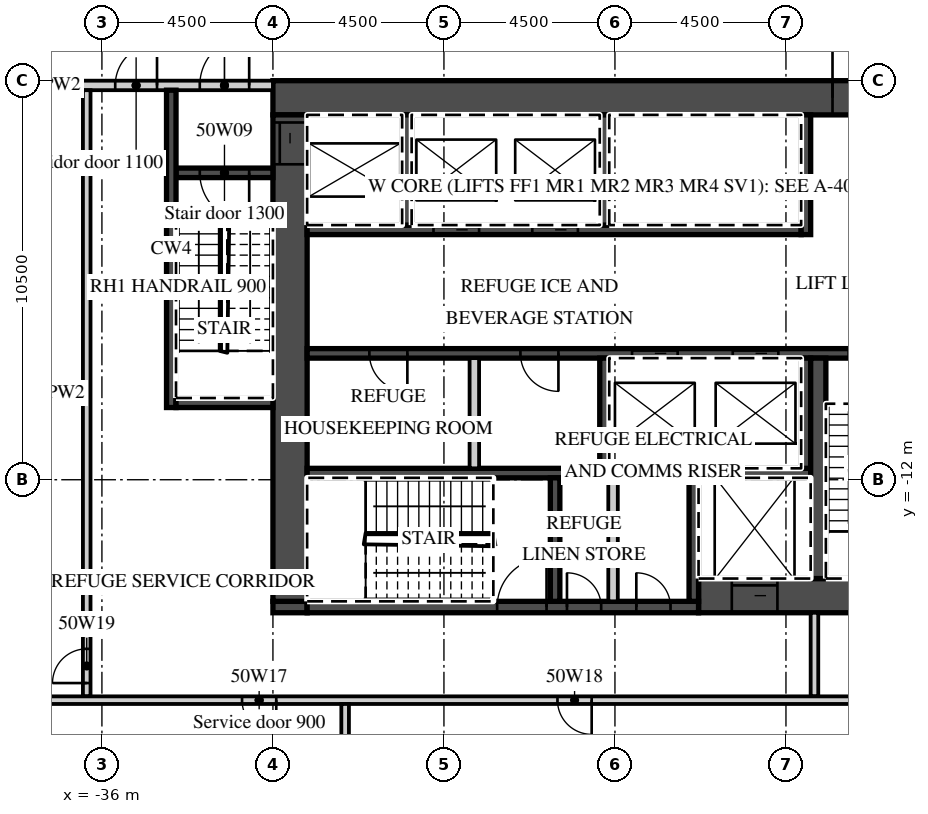
"""IFC4 building model, lengths in metres.
Left out: names, types, materials, properties, quantities, classifications, styles, units other than length and angle.
Written with IfcOpenShell. Run it as: python <this file> out.ifc"""

import sys

from ifc_helpers import new_model, si_unit, direction, frame, frame_2d, origin, place, context, subcontext, project, spatial, rectangle, extrude, element, fill, save


model = new_model("IFC4")
c1 = context("Model", 3, precision=1e-05, world=origin(), true_north=direction((0.0, 1.0)))
c2 = subcontext(c1, "Body", "Model", "MODEL_VIEW")
j1 = project(units=[si_unit("LENGTHUNIT", "METRE"), si_unit("PLANEANGLEUNIT", "RADIAN")], contexts=[c1])
p1 = place(None, origin())
s1 = spatial("IfcSite", under=j1, at=p1, CompositionType="ELEMENT")
p2 = place(p1, origin())
s2 = spatial("IfcBuilding", under=s1, at=p2, CompositionType="ELEMENT")
p3 = place(p2, frame((0.0, 0.0, 206.5)))
s3 = spatial("IfcBuildingStorey", under=s2, at=p3, CompositionType="ELEMENT", Elevation=206.5)
p4 = place(p3, frame((-31.5, -1.95, 0.0), z_axis=(0.0, 0.0, 1.0), x_axis=(1.0, 0.0, 0.0)))
e1 = element("IfcWall", 1, at=p4, inside=s3, PredefinedType="SHEAR", context=c2, shape_type="SweptSolid", body=[
    extrude(rectangle(XDim=18.0, YDim=0.9, at=frame_2d((9.0, 0.0))), origin(), (0.0, 0.0, 1.0), 4.2),
])
p5 = place(p4, frame((14.725, 0.0, 0.0)))
e2 = element("IfcOpeningElement", 2, at=p5, cuts=e1, PredefinedType="OPENING", context=c2, shape_type="SweptSolid", body=[
    extrude(rectangle(XDim=1.8, YDim=2.1, at=frame_2d((0.9, 1.05))), frame((0.0, 0.46, 0.0), z_axis=(0.0, -1.0, 0.0), x_axis=(1.0, 0.0, 0.0)), (0.0, 0.0, 1.0), 0.92),
])
p6 = place(p3, frame((-20.3, -15.05, 0.0), z_axis=(0.0, 0.0, 1.0), x_axis=(1.0, 0.0, 0.0)))
e3 = element("IfcWall", 3, at=p6, inside=s3, PredefinedType="SHEAR", context=c2, shape_type="SweptSolid", body=[
    extrude(rectangle(XDim=6.8, YDim=0.9, at=frame_2d((3.4, 0.0))), origin(), (0.0, 0.0, 1.0), 4.2),
])
p7 = place(p6, frame((0.875, 0.0, 0.0)))
e4 = element("IfcOpeningElement", 4, at=p7, cuts=e3, PredefinedType="OPENING", context=c2, shape_type="SweptSolid", body=[
    extrude(rectangle(XDim=1.2, YDim=2.1, at=frame_2d((0.6, 1.05))), frame((0.0, 0.46, 0.0), z_axis=(0.0, -1.0, 0.0), x_axis=(1.0, 0.0, 0.0)), (0.0, 0.0, 1.0), 0.92),
])
p8 = place(p3, frame((-31.5, -15.35, 0.0), z_axis=(0.0, 0.0, 1.0), x_axis=(1.0, 0.0, 0.0)))
e5 = element("IfcWall", 5, at=p8, inside=s3, PredefinedType="SHEAR", context=c2, shape_type="SweptSolid", body=[
    extrude(rectangle(XDim=0.9, YDim=0.3, at=frame_2d((0.45, 0.0))), origin(), (0.0, 0.0, 1.0), 4.2),
])
p9 = place(p3, frame((-30.6, -15.35, 0.0), z_axis=(0.0, 0.0, 1.0), x_axis=(1.0, 0.0, 0.0)))
e6 = element("IfcWall", 6, at=p9, inside=s3, PredefinedType="SHEAR", context=c2, shape_type="SweptSolid", body=[
    extrude(rectangle(XDim=10.3, YDim=0.3, at=frame_2d((5.15, 0.0))), origin(), (0.0, 0.0, 1.0), 4.2),
])
p10 = place(p9, frame((5.0, 0.0, 0.0)))
e7 = element("IfcOpeningElement", 7, at=p10, cuts=e6, PredefinedType="OPENING", context=c2, shape_type="SweptSolid", body=[
    extrude(rectangle(XDim=1.3, YDim=2.1, at=frame_2d((0.65, 1.05))), frame((0.0, 0.16, 0.0), z_axis=(0.0, -1.0, 0.0), x_axis=(1.0, 0.0, 0.0)), (0.0, 0.0, 1.0), 0.32),
])
p11 = place(p9, frame((6.837, 0.0, 0.0)))
e8 = element("IfcOpeningElement", 8, at=p11, cuts=e6, PredefinedType="OPENING", context=c2, shape_type="SweptSolid", body=[
    extrude(rectangle(XDim=0.9, YDim=2.1, at=frame_2d((0.45, 1.05))), frame((0.0, 0.16, 0.0), z_axis=(0.0, -1.0, 0.0), x_axis=(1.0, 0.0, 0.0)), (0.0, 0.0, 1.0), 0.32),
])
p12 = place(p9, frame((8.663, 0.0, 0.0)))
e9 = element("IfcOpeningElement", 9, at=p12, cuts=e6, PredefinedType="OPENING", context=c2, shape_type="SweptSolid", body=[
    extrude(rectangle(XDim=0.9, YDim=2.1, at=frame_2d((0.45, 1.05))), frame((0.0, 0.16, 0.0), z_axis=(0.0, -1.0, 0.0), x_axis=(1.0, 0.0, 0.0)), (0.0, 0.0, 1.0), 0.32),
])
p13 = place(p3, frame((-31.05, -15.2, 0.0), z_axis=(0.0, 0.0, 1.0), x_axis=(0.0, 1.0, 0.0)))
e10 = element("IfcWall", 10, at=p13, inside=s3, PredefinedType="SHEAR", context=c2, shape_type="SweptSolid", body=[
    extrude(rectangle(XDim=12.8, YDim=0.9, at=frame_2d((6.4, 0.0))), origin(), (0.0, 0.0, 1.0), 4.2),
])
p14 = place(p13, frame((11.5, 0.0, 0.0)))
e11 = element("IfcOpeningElement", 11, at=p14, cuts=e10, PredefinedType="OPENING", context=c2, shape_type="SweptSolid", body=[
    extrude(rectangle(XDim=1.1, YDim=2.1, at=frame_2d((0.55, 1.05))), frame((0.0, 0.46, 0.0), z_axis=(0.0, -1.0, 0.0), x_axis=(1.0, 0.0, 0.0)), (0.0, 0.0, 1.0), 0.92),
])
p15 = place(p3, frame((-30.6, -5.425, 0.0), z_axis=(0.0, 0.0, 1.0), x_axis=(1.0, 0.0, 0.0)))
e12 = element("IfcWall", 12, at=p15, inside=s3, PredefinedType="SHEAR", context=c2, shape_type="SweptSolid", body=[
    extrude(rectangle(XDim=13.0, YDim=0.25, at=frame_2d((6.5, 0.0))), origin(), (0.0, 0.0, 1.0), 4.2),
])
p16 = place(p15, frame((3.325, 0.0, 0.0)))
e13 = element("IfcOpeningElement", 13, at=p16, cuts=e12, PredefinedType="OPENING", context=c2, shape_type="SweptSolid", body=[
    extrude(rectangle(XDim=1.2, YDim=2.1, at=frame_2d((0.6, 1.05))), frame((0.0, 0.135, 0.0), z_axis=(0.0, -1.0, 0.0), x_axis=(1.0, 0.0, 0.0)), (0.0, 0.0, 1.0), 0.27),
])
p17 = place(p15, frame((5.925, 0.0, 0.0)))
e14 = element("IfcOpeningElement", 14, at=p17, cuts=e12, PredefinedType="OPENING", context=c2, shape_type="SweptSolid", body=[
    extrude(rectangle(XDim=1.2, YDim=2.1, at=frame_2d((0.6, 1.05))), frame((0.0, 0.135, 0.0), z_axis=(0.0, -1.0, 0.0), x_axis=(1.0, 0.0, 0.0)), (0.0, 0.0, 1.0), 0.27),
])
p18 = place(p3, frame((-17.475, -5.55, 0.0), z_axis=(0.0, 0.0, 1.0), x_axis=(0.0, 1.0, 0.0)))
e15 = element("IfcWall", 15, at=p18, inside=s3, PredefinedType="SHEAR", context=c2, shape_type="SweptSolid", body=[
    extrude(rectangle(XDim=3.15, YDim=0.25, at=frame_2d((1.575, 0.0))), origin(), (0.0, 0.0, 1.0), 4.2),
])
for number, where, z_axis, x_axis in (
    (16, (-27.975, -5.3, 0.0), (0.0, 0.0, 1.0), (0.0, 1.0, 0.0)),
    (17, (-22.775, -5.3, 0.0), (0.0, 0.0, 1.0), (0.0, 1.0, 0.0)),
):
    element("IfcWall", number, at=place(p3, frame(where, z_axis=z_axis, x_axis=x_axis)), inside=s3, PredefinedType="SHEAR", context=c2, shape_type="SweptSolid", body=[
        extrude(rectangle(XDim=2.9, YDim=0.25, at=frame_2d((1.45, 0.0))), origin(), (0.0, 0.0, 1.0), 4.2),
    ])
p19 = place(p3, frame((-30.6, -8.675, 0.0), z_axis=(0.0, 0.0, 1.0), x_axis=(1.0, 0.0, 0.0)))
e18 = element("IfcWall", 18, at=p19, inside=s3, PredefinedType="SHEAR", context=c2, shape_type="SweptSolid", body=[
    extrude(rectangle(XDim=16.2, YDim=0.25, at=frame_2d((8.1, 0.0))), origin(), (0.0, 0.0, 1.0), 4.2),
])
p20 = place(p19, frame((8.55, 0.0, 0.0)))
e19 = element("IfcOpeningElement", 19, at=p20, cuts=e18, PredefinedType="OPENING", context=c2, shape_type="SweptSolid", body=[
    extrude(rectangle(XDim=1.2, YDim=2.1, at=frame_2d((0.6, 1.05))), frame((0.0, 0.135, 0.0), z_axis=(0.0, -1.0, 0.0), x_axis=(1.0, 0.0, 0.0)), (0.0, 0.0, 1.0), 0.27),
])
p21 = place(p19, frame((11.2, 0.0, 0.0)))
e20 = element("IfcOpeningElement", 20, at=p21, cuts=e18, PredefinedType="OPENING", context=c2, shape_type="SweptSolid", body=[
    extrude(rectangle(XDim=1.2, YDim=2.1, at=frame_2d((0.6, 1.05))), frame((0.0, 0.135, 0.0), z_axis=(0.0, -1.0, 0.0), x_axis=(1.0, 0.0, 0.0)), (0.0, 0.0, 1.0), 0.27),
])
p22 = place(p19, frame((14.25, 0.0, 0.0)))
e21 = element("IfcOpeningElement", 21, at=p22, cuts=e18, PredefinedType="OPENING", context=c2, shape_type="SweptSolid", body=[
    extrude(rectangle(XDim=1.3, YDim=2.1, at=frame_2d((0.65, 1.05))), frame((0.0, 0.135, 0.0), z_axis=(0.0, -1.0, 0.0), x_axis=(1.0, 0.0, 0.0)), (0.0, 0.0, 1.0), 0.27),
])
p23 = place(p19, frame((1.637, 0.0, 0.0)))
e22 = element("IfcOpeningElement", 22, at=p23, cuts=e18, PredefinedType="OPENING", context=c2, shape_type="SweptSolid", body=[
    extrude(rectangle(XDim=1.0, YDim=2.1, at=frame_2d((0.5, 1.05))), frame((0.0, 0.135, 0.0), z_axis=(0.0, -1.0, 0.0), x_axis=(1.0, 0.0, 0.0)), (0.0, 0.0, 1.0), 0.27),
])
p24 = place(p19, frame((5.613, 0.0, 0.0)))
e23 = element("IfcOpeningElement", 23, at=p24, cuts=e18, PredefinedType="OPENING", context=c2, shape_type="SweptSolid", body=[
    extrude(rectangle(XDim=1.0, YDim=2.1, at=frame_2d((0.5, 1.05))), frame((0.0, 0.135, 0.0), z_axis=(0.0, -1.0, 0.0), x_axis=(1.0, 0.0, 0.0)), (0.0, 0.0, 1.0), 0.27),
])
p25 = place(p3, frame((-30.6, -11.825, 0.0), z_axis=(0.0, 0.0, 1.0), x_axis=(1.0, 0.0, 0.0)))
e24 = element("IfcWall", 24, at=p25, inside=s3, PredefinedType="SHEAR", context=c2, shape_type="SweptSolid", body=[
    extrude(rectangle(XDim=13.25, YDim=0.25, at=frame_2d((6.625, 0.0))), origin(), (0.0, 0.0, 1.0), 4.2),
])
for number, where, z_axis, x_axis in (
    (25, (-17.475, -11.7, 0.0), (0.0, 0.0, 1.0), (0.0, 1.0, 0.0)),
    (26, (-22.775, -11.7, 0.0), (0.0, 0.0, 1.0), (0.0, 1.0, 0.0)),
):
    element("IfcWall", number, at=place(p3, frame(where, z_axis=z_axis, x_axis=x_axis)), inside=s3, PredefinedType="SHEAR", context=c2, shape_type="SweptSolid", body=[
        extrude(rectangle(XDim=2.9, YDim=0.25, at=frame_2d((1.45, 0.0))), origin(), (0.0, 0.0, 1.0), 4.2),
    ])
p26 = place(p3, frame((-26.2, -11.7, 0.0), z_axis=(0.0, 0.0, 1.0), x_axis=(0.0, 1.0, 0.0)))
e27 = element("IfcWall", 27, at=p26, inside=s3, PredefinedType="PARTITIONING", context=c2, shape_type="SweptSolid", body=[
    extrude(rectangle(XDim=2.9, YDim=0.25, at=frame_2d((1.45, 0.0))), origin(), (0.0, 0.0, 1.0), 4.2),
])
p27 = place(p3, frame((-17.15, -14.6, 0.0), z_axis=(0.0, 0.0, 1.0), x_axis=(0.0, 1.0, 0.0)))
e28 = element("IfcWall", 28, at=p27, inside=s3, PredefinedType="SHEAR", context=c2, shape_type="SweptSolid", body=[
    extrude(rectangle(XDim=5.8, YDim=0.4, at=frame_2d((2.9, 0.0))), origin(), (0.0, 0.0, 1.0), 4.2),
])
for number, where, z_axis, x_axis in (
    (29, (-20.425, -15.2, 0.0), (0.0, 0.0, 1.0), (0.0, 1.0, 0.0)),
    (30, (-24.075, -15.2, 0.0), (0.0, 0.0, 1.0), (0.0, 1.0, 0.0)),
):
    element("IfcWall", number, at=place(p3, frame(where, z_axis=z_axis, x_axis=x_axis)), inside=s3, PredefinedType="SHEAR", context=c2, shape_type="SweptSolid", body=[
        extrude(rectangle(XDim=3.25, YDim=0.25, at=frame_2d((1.625, 0.0))), origin(), (0.0, 0.0, 1.0), 4.2),
    ])
p28 = place(p3, frame((-22.55, -15.2, 0.0), z_axis=(0.0, 0.0, 1.0), x_axis=(0.0, 1.0, 0.0)))
e31 = element("IfcWall", 31, at=p28, inside=s3, PredefinedType="PARTITIONING", context=c2, shape_type="SweptSolid", body=[
    extrude(rectangle(XDim=3.25, YDim=0.25, at=frame_2d((1.625, 0.0))), origin(), (0.0, 0.0, 1.0), 4.2),
])
p29 = place(p3, frame((-42.632, -1.625, 0.0), z_axis=(0.0, 0.0, 1.0), x_axis=(1.0, 0.0, 0.0)))
e32 = element("IfcWall", 32, at=p29, inside=s3, PredefinedType="PARTITIONING", context=c2, shape_type="SweptSolid", body=[
    extrude(rectangle(XDim=11.132, YDim=0.25, at=frame_2d((5.566, 0.0))), origin(), (0.0, 0.0, 1.0), 4.2),
])
p30 = place(p29, frame((9.207, 0.0, 0.0)))
e33 = element("IfcOpeningElement", 33, at=p30, cuts=e32, PredefinedType="OPENING", context=c2, shape_type="SweptSolid", body=[
    extrude(rectangle(XDim=1.3, YDim=2.1, at=frame_2d((0.65, 1.05))), frame((0.0, 0.135, 0.0), z_axis=(0.0, -1.0, 0.0), x_axis=(1.0, 0.0, 0.0)), (0.0, 0.0, 1.0), 0.27),
])
p31 = place(p29, frame((6.981, 0.0, 0.0)))
e34 = element("IfcOpeningElement", 34, at=p31, cuts=e32, PredefinedType="OPENING", context=c2, shape_type="SweptSolid", body=[
    extrude(rectangle(XDim=1.1, YDim=2.1, at=frame_2d((0.55, 1.05))), frame((0.0, 0.135, 0.0), z_axis=(0.0, -1.0, 0.0), x_axis=(1.0, 0.0, 0.0)), (0.0, 0.0, 1.0), 0.27),
])
p32 = place(p3, frame((-34.05, -3.925, 0.0), z_axis=(0.0, 0.0, 1.0), x_axis=(1.0, 0.0, 0.0)))
e35 = element("IfcWall", 35, at=p32, inside=s3, PredefinedType="SHEAR", context=c2, shape_type="SweptSolid", body=[
    extrude(rectangle(XDim=2.55, YDim=0.25, at=frame_2d((1.275, 0.0))), origin(), (0.0, 0.0, 1.0), 4.2),
])
p33 = place(p32, frame((0.625, 0.0, 0.0)))
e36 = element("IfcOpeningElement", 36, at=p33, cuts=e35, PredefinedType="OPENING", context=c2, shape_type="SweptSolid", body=[
    extrude(rectangle(XDim=1.3, YDim=2.1, at=frame_2d((0.65, 1.05))), frame((0.0, 0.135, 0.0), z_axis=(0.0, -1.0, 0.0), x_axis=(1.0, 0.0, 0.0)), (0.0, 0.0, 1.0), 0.27),
])
p34 = place(p3, frame((-34.175, -10.1, 0.0), z_axis=(0.0, 0.0, 1.0), x_axis=(0.0, 1.0, 0.0)))
e37 = element("IfcWall", 37, at=p34, inside=s3, PredefinedType="SHEAR", context=c2, shape_type="SweptSolid", body=[
    extrude(rectangle(XDim=8.35, YDim=0.25, at=frame_2d((4.175, 0.0))), origin(), (0.0, 0.0, 1.0), 4.2),
])
p35 = place(p3, frame((-34.05, -9.975, 0.0), z_axis=(0.0, 0.0, 1.0), x_axis=(1.0, 0.0, 0.0)))
e38 = element("IfcWall", 38, at=p35, inside=s3, PredefinedType="SHEAR", context=c2, shape_type="SweptSolid", body=[
    extrude(rectangle(XDim=2.55, YDim=0.25, at=frame_2d((1.275, 0.0))), origin(), (0.0, 0.0, 1.0), 4.2),
])
p36 = place(p3, frame((-17.25, -17.7, 0.0), z_axis=(0.0, 0.0, 1.0), x_axis=(0.0, 1.0, 0.0)))
e39 = element("IfcWall", 39, at=p36, inside=s3, PredefinedType="PARTITIONING", context=c2, shape_type="SweptSolid", body=[
    extrude(rectangle(XDim=2.2, YDim=0.2, at=frame_2d((1.1, 0.0))), origin(), (0.0, 0.0, 1.0), 4.2),
])
p37 = place(p3, frame((-36.4, -17.7, 0.0), z_axis=(0.0, 0.0, 1.0), x_axis=(0.0, 1.0, 0.0)))
e40 = element("IfcWall", 40, at=p37, inside=s3, PredefinedType="PARTITIONING", context=c2, shape_type="SweptSolid", body=[
    extrude(rectangle(XDim=15.95, YDim=0.2, at=frame_2d((7.975, 0.0))), origin(), (0.0, 0.0, 1.0), 4.2),
])
p38 = place(p37, frame((0.35, 0.0, 0.0)))
e41 = element("IfcOpeningElement", 41, at=p38, cuts=e40, PredefinedType="OPENING", context=c2, shape_type="SweptSolid", body=[
    extrude(rectangle(XDim=0.9, YDim=2.1, at=frame_2d((0.45, 1.05))), frame((0.0, 0.11, 0.0), z_axis=(0.0, -1.0, 0.0), x_axis=(1.0, 0.0, 0.0)), (0.0, 0.0, 1.0), 0.22),
])
p39 = place(p3, frame((-41.074, -17.8, 0.0), z_axis=(0.0, 0.0, 1.0), x_axis=(1.0, 0.0, 0.0)))
e42 = element("IfcWall", 42, at=p39, inside=s3, PredefinedType="PARTITIONING", context=c2, shape_type="SweptSolid", body=[
    extrude(rectangle(XDim=27.474, YDim=0.2, at=frame_2d((13.737, 0.0))), origin(), (0.0, 0.0, 1.0), 4.2),
])
p40 = place(p39, frame((8.762, 0.0, 0.0)))
e43 = element("IfcOpeningElement", 43, at=p40, cuts=e42, PredefinedType="OPENING", context=c2, shape_type="SweptSolid", body=[
    extrude(rectangle(XDim=0.9, YDim=2.1, at=frame_2d((0.45, 1.05))), frame((0.0, 0.11, 0.0), z_axis=(0.0, -1.0, 0.0), x_axis=(1.0, 0.0, 0.0)), (0.0, 0.0, 1.0), 0.22),
])
p41 = place(p39, frame((17.062, 0.0, 0.0)))
e44 = element("IfcOpeningElement", 44, at=p41, cuts=e42, PredefinedType="OPENING", context=c2, shape_type="SweptSolid", body=[
    extrude(rectangle(XDim=0.9, YDim=2.1, at=frame_2d((0.45, 1.05))), frame((0.0, 0.11, 0.0), z_axis=(0.0, -1.0, 0.0), x_axis=(1.0, 0.0, 0.0)), (0.0, 0.0, 1.0), 0.22),
])
p42 = place(p3, frame((-29.6, -23.852, 0.0), z_axis=(0.0, 0.0, 1.0), x_axis=(0.0, 1.0, 0.0)))
e45 = element("IfcWall", 45, at=p42, inside=s3, PredefinedType="PARTITIONING", context=c2, shape_type="SweptSolid", body=[
    extrude(rectangle(XDim=5.952, YDim=0.2, at=frame_2d((2.976, 0.0))), origin(), (0.0, 0.0, 1.0), 4.2),
])
p43 = place(p20, origin())
e46 = element("IfcDoor", 46, at=p43, inside=s3, OperationType="SLIDING_TO_LEFT", PredefinedType="DOOR", context=c2, shape_type="SweptSolid", body=[
    extrude(rectangle(XDim=1.2, YDim=2.1, at=frame_2d((0.6, 1.05))), frame((0.0, 0.025, 0.0), z_axis=(0.0, -1.0, 0.0), x_axis=(1.0, 0.0, 0.0)), (0.0, 0.0, 1.0), 0.05),
])
fill(e19, e46)
p44 = place(p21, origin())
e47 = element("IfcDoor", 47, at=p44, inside=s3, OperationType="SLIDING_TO_RIGHT", PredefinedType="DOOR", context=c2, shape_type="SweptSolid", body=[
    extrude(rectangle(XDim=1.2, YDim=2.1, at=frame_2d((0.6, 1.05))), frame((0.0, 0.025, 0.0), z_axis=(0.0, -1.0, 0.0), x_axis=(1.0, 0.0, 0.0)), (0.0, 0.0, 1.0), 0.05),
])
fill(e20, e47)
p45 = place(p16, origin())
e48 = element("IfcDoor", 48, at=p45, inside=s3, OperationType="SLIDING_TO_RIGHT", PredefinedType="DOOR", context=c2, shape_type="SweptSolid", body=[
    extrude(rectangle(XDim=1.2, YDim=2.1, at=frame_2d((0.6, 1.05))), frame((0.0, 0.025, 0.0), z_axis=(0.0, -1.0, 0.0), x_axis=(1.0, 0.0, 0.0)), (0.0, 0.0, 1.0), 0.05),
])
fill(e13, e48)
p46 = place(p17, origin())
e49 = element("IfcDoor", 49, at=p46, inside=s3, OperationType="SLIDING_TO_RIGHT", PredefinedType="DOOR", context=c2, shape_type="SweptSolid", body=[
    extrude(rectangle(XDim=1.2, YDim=2.1, at=frame_2d((0.6, 1.05))), frame((0.0, 0.025, 0.0), z_axis=(0.0, -1.0, 0.0), x_axis=(1.0, 0.0, 0.0)), (0.0, 0.0, 1.0), 0.05),
])
fill(e14, e49)
p47 = place(p7, origin())
e50 = element("IfcDoor", 50, at=p47, inside=s3, OperationType="SLIDING_TO_LEFT", PredefinedType="DOOR", context=c2, shape_type="SweptSolid", body=[
    extrude(rectangle(XDim=1.2, YDim=2.1, at=frame_2d((0.6, 1.05))), frame((0.0, 0.025, 0.0), z_axis=(0.0, -1.0, 0.0), x_axis=(1.0, 0.0, 0.0)), (0.0, 0.0, 1.0), 0.05),
])
fill(e4, e50)
p48 = place(p14, origin())
e51 = element("IfcDoor", 51, at=p48, inside=s3, OperationType="SLIDING_TO_RIGHT", PredefinedType="DOOR", context=c2, shape_type="SweptSolid", body=[
    extrude(rectangle(XDim=1.1, YDim=2.1, at=frame_2d((0.55, 1.05))), frame((0.0, 0.025, 0.0), z_axis=(0.0, -1.0, 0.0), x_axis=(1.0, 0.0, 0.0)), (0.0, 0.0, 1.0), 0.05),
])
fill(e11, e51)
p49 = place(p5, origin())
e52 = element("IfcDoor", 52, at=p49, inside=s3, OperationType="DOUBLE_DOOR_DOUBLE_SWING", PredefinedType="DOOR", context=c2, shape_type="SweptSolid", body=[
    extrude(rectangle(XDim=1.8, YDim=2.1, at=frame_2d((0.9, 1.05))), frame((0.0, 0.025, 0.0), z_axis=(0.0, -1.0, 0.0), x_axis=(1.0, 0.0, 0.0)), (0.0, 0.0, 1.0), 0.05),
])
fill(e2, e52)
p50 = place(p30, origin())
e53 = element("IfcDoor", 53, at=p50, inside=s3, OperationType="SINGLE_SWING_RIGHT", PredefinedType="DOOR", context=c2, shape_type="SweptSolid", body=[
    extrude(rectangle(XDim=1.3, YDim=2.1, at=frame_2d((0.65, 1.05))), frame((0.0, 0.025, 0.0), z_axis=(0.0, -1.0, 0.0), x_axis=(1.0, 0.0, 0.0)), (0.0, 0.0, 1.0), 0.05),
])
fill(e33, e53)
p51 = place(p33, origin())
e54 = element("IfcDoor", 54, at=p51, inside=s3, OperationType="SINGLE_SWING_RIGHT", PredefinedType="DOOR", context=c2, shape_type="SweptSolid", body=[
    extrude(rectangle(XDim=1.3, YDim=2.1, at=frame_2d((0.65, 1.05))), frame((0.0, 0.025, 0.0), z_axis=(0.0, -1.0, 0.0), x_axis=(1.0, 0.0, 0.0)), (0.0, 0.0, 1.0), 0.05),
])
fill(e36, e54)
p52 = place(p31, origin())
e55 = element("IfcDoor", 55, at=p52, inside=s3, OperationType="SINGLE_SWING_RIGHT", PredefinedType="DOOR", context=c2, shape_type="SweptSolid", body=[
    extrude(rectangle(XDim=1.1, YDim=2.1, at=frame_2d((0.55, 1.05))), frame((0.0, 0.025, 0.0), z_axis=(0.0, -1.0, 0.0), x_axis=(1.0, 0.0, 0.0)), (0.0, 0.0, 1.0), 0.05),
])
fill(e34, e55)
p53 = place(p22, origin())
e56 = element("IfcDoor", 56, at=p53, inside=s3, OperationType="SINGLE_SWING_RIGHT", PredefinedType="DOOR", context=c2, shape_type="SweptSolid", body=[
    extrude(rectangle(XDim=1.3, YDim=2.1, at=frame_2d((0.65, 1.05))), frame((0.0, 0.025, 0.0), z_axis=(0.0, -1.0, 0.0), x_axis=(1.0, 0.0, 0.0)), (0.0, 0.0, 1.0), 0.05),
])
fill(e21, e56)
p54 = place(p10, origin())
e57 = element("IfcDoor", 57, at=p54, inside=s3, OperationType="SINGLE_SWING_RIGHT", PredefinedType="DOOR", context=c2, shape_type="SweptSolid", body=[
    extrude(rectangle(XDim=1.3, YDim=2.1, at=frame_2d((0.65, 1.05))), frame((0.0, 0.025, 0.0), z_axis=(0.0, -1.0, 0.0), x_axis=(1.0, 0.0, 0.0)), (0.0, 0.0, 1.0), 0.05),
])
fill(e7, e57)
p55 = place(p11, origin())
e58 = element("IfcDoor", 58, at=p55, inside=s3, OperationType="SINGLE_SWING_LEFT", PredefinedType="DOOR", context=c2, shape_type="SweptSolid", body=[
    extrude(rectangle(XDim=0.9, YDim=2.1, at=frame_2d((0.45, 1.05))), frame((0.0, 0.025, 0.0), z_axis=(0.0, -1.0, 0.0), x_axis=(1.0, 0.0, 0.0)), (0.0, 0.0, 1.0), 0.05),
])
fill(e8, e58)
p56 = place(p12, origin())
e59 = element("IfcDoor", 59, at=p56, inside=s3, OperationType="SINGLE_SWING_LEFT", PredefinedType="DOOR", context=c2, shape_type="SweptSolid", body=[
    extrude(rectangle(XDim=0.9, YDim=2.1, at=frame_2d((0.45, 1.05))), frame((0.0, 0.025, 0.0), z_axis=(0.0, -1.0, 0.0), x_axis=(1.0, 0.0, 0.0)), (0.0, 0.0, 1.0), 0.05),
])
fill(e9, e59)
p57 = place(p23, origin())
e60 = element("IfcDoor", 60, at=p57, inside=s3, OperationType="SINGLE_SWING_RIGHT", PredefinedType="DOOR", context=c2, shape_type="SweptSolid", body=[
    extrude(rectangle(XDim=1.0, YDim=2.1, at=frame_2d((0.5, 1.05))), frame((0.0, 0.025, 0.0), z_axis=(0.0, -1.0, 0.0), x_axis=(1.0, 0.0, 0.0)), (0.0, 0.0, 1.0), 0.05),
])
fill(e22, e60)
p58 = place(p24, origin())
e61 = element("IfcDoor", 61, at=p58, inside=s3, OperationType="SINGLE_SWING_RIGHT", PredefinedType="DOOR", context=c2, shape_type="SweptSolid", body=[
    extrude(rectangle(XDim=1.0, YDim=2.1, at=frame_2d((0.5, 1.05))), frame((0.0, 0.025, 0.0), z_axis=(0.0, -1.0, 0.0), x_axis=(1.0, 0.0, 0.0)), (0.0, 0.0, 1.0), 0.05),
])
fill(e23, e61)
p59 = place(p40, origin())
e62 = element("IfcDoor", 62, at=p59, inside=s3, OperationType="SINGLE_SWING_RIGHT", PredefinedType="DOOR", context=c2, shape_type="SweptSolid", body=[
    extrude(rectangle(XDim=0.9, YDim=2.1, at=frame_2d((0.45, 1.05))), frame((0.0, 0.025, 0.0), z_axis=(0.0, -1.0, 0.0), x_axis=(1.0, 0.0, 0.0)), (0.0, 0.0, 1.0), 0.05),
])
fill(e43, e62)
p60 = place(p41, origin())
e63 = element("IfcDoor", 63, at=p60, inside=s3, OperationType="SINGLE_SWING_RIGHT", PredefinedType="DOOR", context=c2, shape_type="SweptSolid", body=[
    extrude(rectangle(XDim=0.9, YDim=2.1, at=frame_2d((0.45, 1.05))), frame((0.0, 0.025, 0.0), z_axis=(0.0, -1.0, 0.0), x_axis=(1.0, 0.0, 0.0)), (0.0, 0.0, 1.0), 0.05),
])
fill(e44, e63)
p61 = place(p38, origin())
e64 = element("IfcDoor", 64, at=p61, inside=s3, OperationType="SINGLE_SWING_LEFT", PredefinedType="DOOR", context=c2, shape_type="SweptSolid", body=[
    extrude(rectangle(XDim=0.9, YDim=2.1, at=frame_2d((0.45, 1.05))), frame((0.0, 0.025, 0.0), z_axis=(0.0, -1.0, 0.0), x_axis=(1.0, 0.0, 0.0)), (0.0, 0.0, 1.0), 0.05),
])
fill(e41, e64)
save(model, sys.argv[1])
